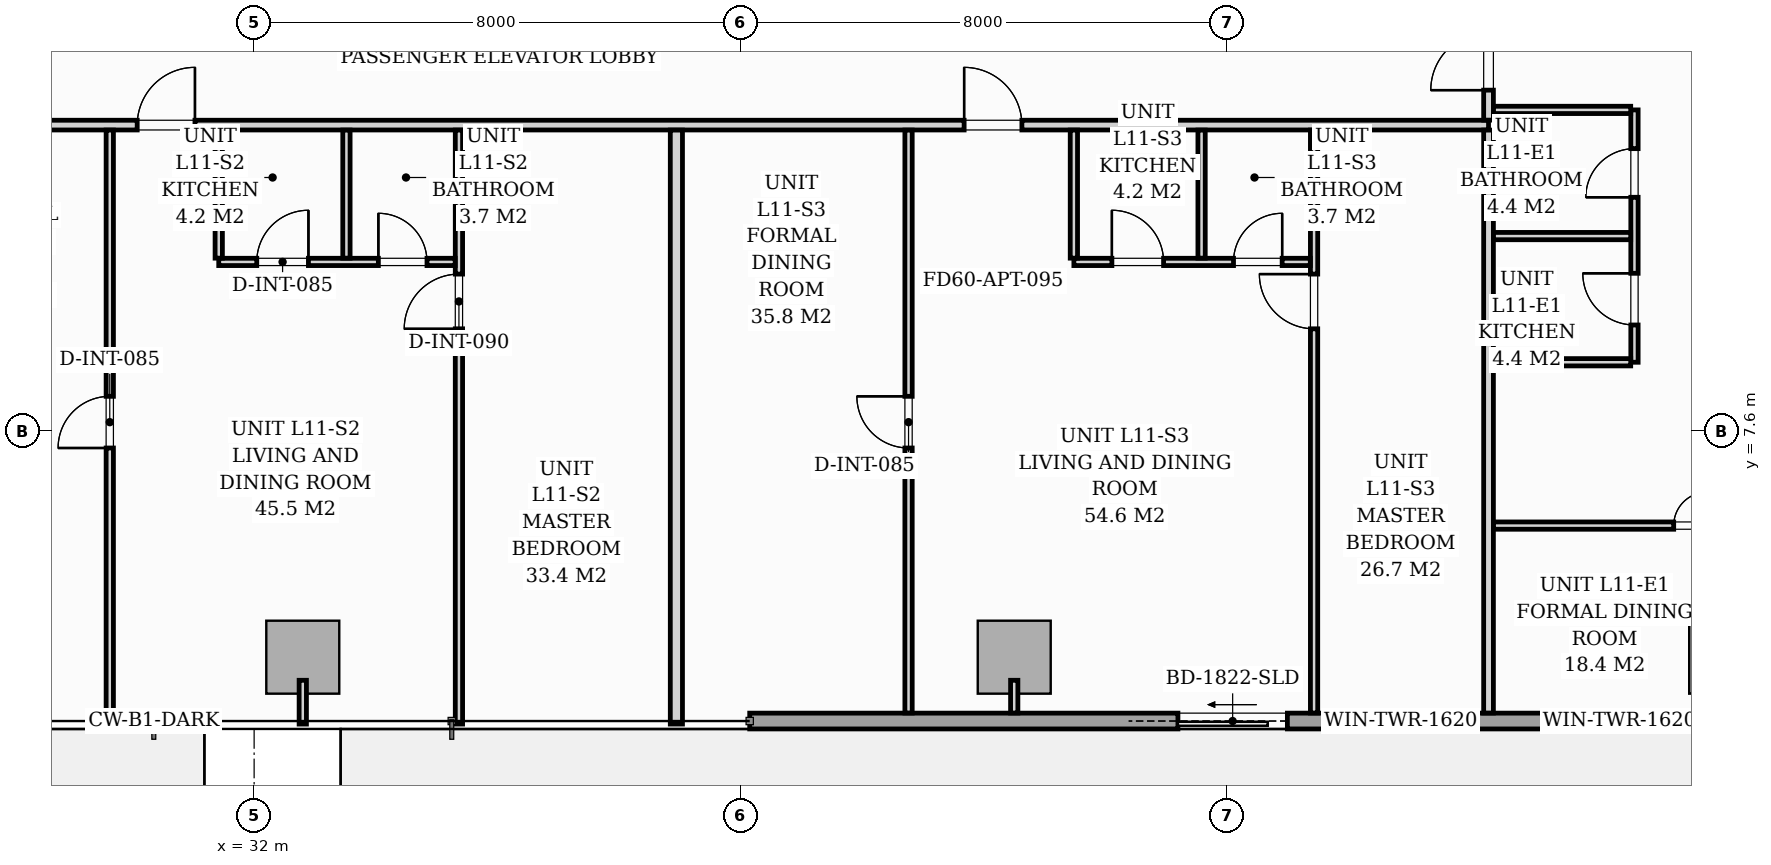
"""IFC4 building model, lengths in metres.
Left out: names, types, materials, properties, quantities, classifications, styles, units other than length and angle.
Written with IfcOpenShell. Run it as: python <this file> out.ifc"""

import sys

from ifc_helpers import new_model, si_unit, direction, frame, frame_2d, origin, origin_2d, place, context, subcontext, project, spatial, rectangle, extrude, source, transform, mapped, element, fill, save


model = new_model("IFC4")
c1 = context("Model", 3, precision=1e-05, world=origin(), true_north=direction((0.0, 1.0)))
c2 = subcontext(c1, "Body", "Model", "MODEL_VIEW")
j1 = project(units=[si_unit("LENGTHUNIT", "METRE"), si_unit("PLANEANGLEUNIT", "RADIAN")], contexts=[c1])
p1 = place(None, origin())
s1 = spatial("IfcSite", under=j1, at=p1, CompositionType="ELEMENT")
p2 = place(p1, origin())
s2 = spatial("IfcBuilding", under=s1, at=p2, CompositionType="ELEMENT")
p3 = place(p2, frame((0.0, 0.0, 42.2)))
s3 = spatial("IfcBuildingStorey", under=s2, at=p3, CompositionType="ELEMENT", Elevation=42.2)
m1 = source(origin(), c2, "Body", "SweptSolid", [
    extrude(rectangle(XDim=1.2, YDim=1.2, at=origin_2d()), origin(), (0.0, 0.0, 1.0), 3.196),
])
for number, where, z_axis, x_axis in (
    (1, (32.8, 3.88, 0.002), (0.0, 0.0, 1.0), (1.0, 0.0, 0.0)),
    (2, (44.5, 3.88, 0.002), (0.0, 0.0, 1.0), (1.0, 0.0, 0.0)),
    (3, (56.2, 3.88, 0.002), (0.0, 0.0, 1.0), (1.0, 0.0, 0.0)),
):
    element("IfcColumn", number, at=place(p3, frame(where, z_axis=z_axis, x_axis=x_axis)), inside=s3, PredefinedType="COLUMN", context=c2, shape_type="MappedRepresentation", body=[
        mapped(m1, transform((0.0, 0.0, 0.0), scale=1.0)),
    ])
p4 = place(p3, frame((57.3, 2.83, 0.0), z_axis=(0.0, 0.0, 1.0), x_axis=(-1.0, 0.0, 0.0)))
e4 = element("IfcWall", 4, at=p4, inside=s3, PredefinedType="STANDARD", context=c2, shape_type="SweptSolid", body=[
    extrude(rectangle(XDim=17.15, YDim=0.26, at=frame_2d((8.575, 0.0))), origin(), (0.0, 0.0, 1.0), 2.94),
])
p5 = place(p4, frame((8.308, 0.0, 0.0)))
e5 = element("IfcOpeningElement", 5, at=p5, cuts=e4, PredefinedType="OPENING", context=c2, shape_type="SweptSolid", body=[
    extrude(rectangle(XDim=1.8, YDim=2.06, at=frame_2d((0.9, 1.03))), frame((0.0, 0.14, 0.0), z_axis=(0.0, -1.0, 0.0), x_axis=(1.0, 0.0, 0.0)), (0.0, 0.0, 1.0), 0.28),
])
p6 = place(p4, frame((2.05, 0.0, 0.65)))
e6 = element("IfcOpeningElement", 6, at=p6, cuts=e4, PredefinedType="OPENING", context=c2, shape_type="SweptSolid", body=[
    extrude(rectangle(XDim=1.6, YDim=1.5, at=frame_2d((0.8, 0.75))), frame((0.0, 0.14, 0.0), z_axis=(0.0, -1.0, 0.0), x_axis=(1.0, 0.0, 0.0)), (0.0, 0.0, 1.0), 0.28),
])
p7 = place(p4, frame((5.644, 0.0, 0.75)))
e7 = element("IfcOpeningElement", 7, at=p7, cuts=e4, PredefinedType="OPENING", context=c2, shape_type="SweptSolid", body=[
    extrude(rectangle(XDim=1.6, YDim=1.5, at=frame_2d((0.8, 0.75))), frame((0.0, 0.14, 0.0), z_axis=(0.0, -1.0, 0.0), x_axis=(1.0, 0.0, 0.0)), (0.0, 0.0, 1.0), 0.28),
])
p8 = place(p3, frame((15.2, 12.63, 0.0), z_axis=(0.0, 0.0, 1.0), x_axis=(1.0, 0.0, 0.0)))
e8 = element("IfcWall", 8, at=p8, inside=s3, PredefinedType="PARTITIONING", context=c2, shape_type="SweptSolid", body=[
    extrude(rectangle(XDim=37.1, YDim=0.16, at=frame_2d((18.55, 0.0))), origin(), (0.0, 0.0, 1.0), 2.94),
])
p9 = place(p8, frame((1.572, 0.0, 0.0)))
e9 = element("IfcOpeningElement", 9, at=p9, cuts=e8, PredefinedType="OPENING", context=c2, shape_type="SweptSolid", body=[
    extrude(rectangle(XDim=0.95, YDim=2.06, at=frame_2d((0.475, 1.03))), frame((0.0, 0.09, 0.0), z_axis=(0.0, -1.0, 0.0), x_axis=(1.0, 0.0, 0.0)), (0.0, 0.0, 1.0), 0.18),
])
p10 = place(p8, frame((14.877, 0.0, 0.0)))
e10 = element("IfcOpeningElement", 10, at=p10, cuts=e8, PredefinedType="OPENING", context=c2, shape_type="SweptSolid", body=[
    extrude(rectangle(XDim=0.95, YDim=2.06, at=frame_2d((0.475, 1.03))), frame((0.0, 0.09, 0.0), z_axis=(0.0, -1.0, 0.0), x_axis=(1.0, 0.0, 0.0)), (0.0, 0.0, 1.0), 0.18),
])
p11 = place(p8, frame((28.476, 0.0, 0.0)))
e11 = element("IfcOpeningElement", 11, at=p11, cuts=e8, PredefinedType="OPENING", context=c2, shape_type="SweptSolid", body=[
    extrude(rectangle(XDim=0.95, YDim=2.06, at=frame_2d((0.475, 1.03))), frame((0.0, 0.09, 0.0), z_axis=(0.0, -1.0, 0.0), x_axis=(1.0, 0.0, 0.0)), (0.0, 0.0, 1.0), 0.18),
])
p12 = place(p3, frame((52.3, 2.962, 0.0), z_axis=(0.0, 0.0, 1.0), x_axis=(0.0, 1.0, 0.0)))
e12 = element("IfcWall", 12, at=p12, inside=s3, PredefinedType="PARTITIONING", context=c2, shape_type="SweptSolid", body=[
    extrude(rectangle(XDim=9.586, YDim=0.16, at=frame_2d((4.793, 0.0))), origin(), (0.0, 0.0, 1.0), 2.94),
])
p13 = place(p3, frame((52.3, 12.712, 0.0), z_axis=(0.0, 0.0, 1.0), x_axis=(0.0, 1.0, 0.0)))
e13 = element("IfcWall", 13, at=p13, inside=s3, PredefinedType="PARTITIONING", context=c2, shape_type="SweptSolid", body=[
    extrude(rectangle(XDim=14.726, YDim=0.16, at=frame_2d((7.363, 0.0))), origin(), (0.0, 0.0, 1.0), 2.94),
])
p14 = place(p13, frame((0.493, 0.0, 0.0)))
e14 = element("IfcOpeningElement", 14, at=p14, cuts=e13, PredefinedType="OPENING", context=c2, shape_type="SweptSolid", body=[
    extrude(rectangle(XDim=0.95, YDim=2.06, at=frame_2d((0.475, 1.03))), frame((0.0, 0.09, 0.0), z_axis=(0.0, -1.0, 0.0), x_axis=(1.0, 0.0, 0.0)), (0.0, 0.0, 1.0), 0.18),
])
p15 = place(p13, frame((5.433, 0.0, 0.0)))
e15 = element("IfcOpeningElement", 15, at=p15, cuts=e13, PredefinedType="OPENING", context=c2, shape_type="SweptSolid", body=[
    extrude(rectangle(XDim=0.95, YDim=2.06, at=frame_2d((0.475, 1.03))), frame((0.0, 0.09, 0.0), z_axis=(0.0, -1.0, 0.0), x_axis=(1.0, 0.0, 0.0)), (0.0, 0.0, 1.0), 0.18),
])
p16 = place(p3, frame((35.368, 2.78, 0.0), z_axis=(0.0, 0.0, 1.0), x_axis=(0.0, 1.0, 0.0)))
e16 = element("IfcWall", 16, at=p16, inside=s3, PredefinedType="PARTITIONING", context=c2, shape_type="SweptSolid", body=[
    extrude(rectangle(XDim=9.768, YDim=0.12, at=frame_2d((4.884, 0.0))), origin(), (0.0, 0.0, 1.0), 2.94),
])
p17 = place(p16, frame((6.5, 0.0, 0.0)))
e17 = element("IfcOpeningElement", 17, at=p17, cuts=e16, PredefinedType="OPENING", context=c2, shape_type="SweptSolid", body=[
    extrude(rectangle(XDim=0.9, YDim=2.05, at=frame_2d((0.45, 1.025))), frame((0.0, 0.07, 0.0), z_axis=(0.0, -1.0, 0.0), x_axis=(1.0, 0.0, 0.0)), (0.0, 0.0, 1.0), 0.14),
])
p18 = place(p3, frame((31.418, 10.38, 0.0), z_axis=(0.0, 0.0, 1.0), x_axis=(1.0, 0.0, 0.0)))
e18 = element("IfcWall", 18, at=p18, inside=s3, PredefinedType="PARTITIONING", context=c2, shape_type="SweptSolid", body=[
    extrude(rectangle(XDim=3.888, YDim=0.12, at=frame_2d((1.944, 0.0))), origin(), (0.0, 0.0, 1.0), 2.94),
])
p19 = place(p18, frame((0.625, 0.0, 0.0)))
e19 = element("IfcOpeningElement", 19, at=p19, cuts=e18, PredefinedType="OPENING", context=c2, shape_type="SweptSolid", body=[
    extrude(rectangle(XDim=0.85, YDim=2.05, at=frame_2d((0.425, 1.025))), frame((0.0, 0.07, 0.0), z_axis=(0.0, -1.0, 0.0), x_axis=(1.0, 0.0, 0.0)), (0.0, 0.0, 1.0), 0.14),
])
p20 = place(p18, frame((2.625, 0.0, 0.0)))
e20 = element("IfcOpeningElement", 20, at=p20, cuts=e18, PredefinedType="OPENING", context=c2, shape_type="SweptSolid", body=[
    extrude(rectangle(XDim=0.8, YDim=2.02, at=frame_2d((0.4, 1.01))), frame((0.0, 0.07, 0.0), z_axis=(0.0, -1.0, 0.0), x_axis=(1.0, 0.0, 0.0)), (0.0, 0.0, 1.0), 0.14),
])
for number, where, z_axis, x_axis in (
    (21, (33.518, 10.442, 0.0), (0.0, 0.0, 1.0), (0.0, 1.0, 0.0)),
    (22, (31.418, 10.442, 0.0), (0.0, 0.0, 1.0), (0.0, 1.0, 0.0)),
):
    element("IfcWall", number, at=place(p3, frame(where, z_axis=z_axis, x_axis=x_axis)), inside=s3, PredefinedType="PARTITIONING", context=c2, shape_type="SweptSolid", body=[
        extrude(rectangle(XDim=2.106, YDim=0.12, at=frame_2d((1.053, 0.0))), origin(), (0.0, 0.0, 1.0), 2.94),
    ])
p21 = place(p3, frame((29.626, 2.78, 0.0), z_axis=(0.0, 0.0, 1.0), x_axis=(0.0, 1.0, 0.0)))
e23 = element("IfcWall", 23, at=p21, inside=s3, PredefinedType="PARTITIONING", context=c2, shape_type="SweptSolid", body=[
    extrude(rectangle(XDim=9.768, YDim=0.12, at=frame_2d((4.884, 0.0))), origin(), (0.0, 0.0, 1.0), 2.94),
])
p22 = place(p21, frame((4.54, 0.0, 0.0)))
e24 = element("IfcOpeningElement", 24, at=p22, cuts=e23, PredefinedType="OPENING", context=c2, shape_type="SweptSolid", body=[
    extrude(rectangle(XDim=0.85, YDim=2.05, at=frame_2d((0.425, 1.025))), frame((0.0, 0.07, 0.0), z_axis=(0.0, -1.0, 0.0), x_axis=(1.0, 0.0, 0.0)), (0.0, 0.0, 1.0), 0.14),
])
p23 = place(p3, frame((38.944, 2.78, 0.0), z_axis=(0.0, 0.0, 1.0), x_axis=(0.0, 1.0, 0.0)))
e25 = element("IfcWall", 25, at=p23, inside=s3, PredefinedType="PARTITIONING", context=c2, shape_type="SweptSolid", body=[
    extrude(rectangle(XDim=9.768, YDim=0.2, at=frame_2d((4.884, 0.0))), origin(), (0.0, 0.0, 1.0), 2.94),
])
p24 = place(p3, frame((49.431, 2.962, 0.0), z_axis=(0.0, 0.0, 1.0), x_axis=(0.0, 1.0, 0.0)))
e26 = element("IfcWall", 26, at=p24, inside=s3, PredefinedType="PARTITIONING", context=c2, shape_type="SweptSolid", body=[
    extrude(rectangle(XDim=9.586, YDim=0.12, at=frame_2d((4.793, 0.0))), origin(), (0.0, 0.0, 1.0), 2.94),
])
p25 = place(p24, frame((6.318, 0.0, 0.0)))
e27 = element("IfcOpeningElement", 27, at=p25, cuts=e26, PredefinedType="OPENING", context=c2, shape_type="SweptSolid", body=[
    extrude(rectangle(XDim=0.9, YDim=2.05, at=frame_2d((0.45, 1.025))), frame((0.0, 0.07, 0.0), z_axis=(0.0, -1.0, 0.0), x_axis=(1.0, 0.0, 0.0)), (0.0, 0.0, 1.0), 0.14),
])
p26 = place(p3, frame((45.481, 10.38, 0.0), z_axis=(0.0, 0.0, 1.0), x_axis=(1.0, 0.0, 0.0)))
e28 = element("IfcWall", 28, at=p26, inside=s3, PredefinedType="PARTITIONING", context=c2, shape_type="SweptSolid", body=[
    extrude(rectangle(XDim=3.888, YDim=0.12, at=frame_2d((1.944, 0.0))), origin(), (0.0, 0.0, 1.0), 2.94),
])
p27 = place(p26, frame((0.625, 0.0, 0.0)))
e29 = element("IfcOpeningElement", 29, at=p27, cuts=e28, PredefinedType="OPENING", context=c2, shape_type="SweptSolid", body=[
    extrude(rectangle(XDim=0.85, YDim=2.05, at=frame_2d((0.425, 1.025))), frame((0.0, 0.07, 0.0), z_axis=(0.0, -1.0, 0.0), x_axis=(1.0, 0.0, 0.0)), (0.0, 0.0, 1.0), 0.14),
])
p28 = place(p26, frame((2.625, 0.0, 0.0)))
e30 = element("IfcOpeningElement", 30, at=p28, cuts=e28, PredefinedType="OPENING", context=c2, shape_type="SweptSolid", body=[
    extrude(rectangle(XDim=0.8, YDim=2.02, at=frame_2d((0.4, 1.01))), frame((0.0, 0.07, 0.0), z_axis=(0.0, -1.0, 0.0), x_axis=(1.0, 0.0, 0.0)), (0.0, 0.0, 1.0), 0.14),
])
for number, where, z_axis, x_axis in (
    (31, (47.581, 10.442, 0.0), (0.0, 0.0, 1.0), (0.0, 1.0, 0.0)),
    (32, (45.481, 10.442, 0.0), (0.0, 0.0, 1.0), (0.0, 1.0, 0.0)),
):
    element("IfcWall", number, at=place(p3, frame(where, z_axis=z_axis, x_axis=x_axis)), inside=s3, PredefinedType="PARTITIONING", context=c2, shape_type="SweptSolid", body=[
        extrude(rectangle(XDim=2.106, YDim=0.12, at=frame_2d((1.053, 0.0))), origin(), (0.0, 0.0, 1.0), 2.94),
    ])
p29 = place(p3, frame((42.762, 2.962, 0.0), z_axis=(0.0, 0.0, 1.0), x_axis=(0.0, 1.0, 0.0)))
e33 = element("IfcWall", 33, at=p29, inside=s3, PredefinedType="PARTITIONING", context=c2, shape_type="SweptSolid", body=[
    extrude(rectangle(XDim=9.586, YDim=0.12, at=frame_2d((4.793, 0.0))), origin(), (0.0, 0.0, 1.0), 2.94),
])
p30 = place(p29, frame((4.358, 0.0, 0.0)))
e34 = element("IfcOpeningElement", 34, at=p30, cuts=e33, PredefinedType="OPENING", context=c2, shape_type="SweptSolid", body=[
    extrude(rectangle(XDim=0.85, YDim=2.05, at=frame_2d((0.425, 1.025))), frame((0.0, 0.07, 0.0), z_axis=(0.0, -1.0, 0.0), x_axis=(1.0, 0.0, 0.0)), (0.0, 0.0, 1.0), 0.14),
])
p31 = place(p3, frame((54.7, 8.73, 0.0), z_axis=(0.0, 0.0, 1.0), x_axis=(0.0, 1.0, 0.0)))
e35 = element("IfcWall", 35, at=p31, inside=s3, PredefinedType="PARTITIONING", context=c2, shape_type="SweptSolid", body=[
    extrude(rectangle(XDim=4.15, YDim=0.12, at=frame_2d((2.075, 0.0))), origin(), (0.0, 0.0, 1.0), 2.94),
])
p32 = place(p31, frame((0.613, 0.0, 0.0)))
e36 = element("IfcOpeningElement", 36, at=p32, cuts=e35, PredefinedType="OPENING", context=c2, shape_type="SweptSolid", body=[
    extrude(rectangle(XDim=0.85, YDim=2.05, at=frame_2d((0.425, 1.025))), frame((0.0, 0.07, 0.0), z_axis=(0.0, -1.0, 0.0), x_axis=(1.0, 0.0, 0.0)), (0.0, 0.0, 1.0), 0.14),
])
p33 = place(p31, frame((2.713, 0.0, 0.0)))
e37 = element("IfcOpeningElement", 37, at=p33, cuts=e35, PredefinedType="OPENING", context=c2, shape_type="SweptSolid", body=[
    extrude(rectangle(XDim=0.8, YDim=2.02, at=frame_2d((0.4, 1.01))), frame((0.0, 0.07, 0.0), z_axis=(0.0, -1.0, 0.0), x_axis=(1.0, 0.0, 0.0)), (0.0, 0.0, 1.0), 0.14),
])
for number, where, z_axis, x_axis in (
    (38, (52.382, 10.805, 0.0), (0.0, 0.0, 1.0), (1.0, 0.0, 0.0)),
    (39, (52.382, 8.73, 0.0), (0.0, 0.0, 1.0), (1.0, 0.0, 0.0)),
    (40, (52.382, 12.88, 0.0), (0.0, 0.0, 1.0), (1.0, 0.0, 0.0)),
):
    element("IfcWall", number, at=place(p3, frame(where, z_axis=z_axis, x_axis=x_axis)), inside=s3, PredefinedType="PARTITIONING", context=c2, shape_type="SweptSolid", body=[
        extrude(rectangle(XDim=2.256, YDim=0.12, at=frame_2d((1.128, 0.0))), origin(), (0.0, 0.0, 1.0), 2.94),
    ])
p34 = place(p3, frame((52.382, 6.044, 0.0), z_axis=(0.0, 0.0, 1.0), x_axis=(1.0, 0.0, 0.0)))
e41 = element("IfcWall", 41, at=p34, inside=s3, PredefinedType="PARTITIONING", context=c2, shape_type="SweptSolid", body=[
    extrude(rectangle(XDim=7.338, YDim=0.12, at=frame_2d((3.669, 0.0))), origin(), (0.0, 0.0, 1.0), 2.94),
])
p35 = place(p34, frame((2.963, 0.0, 0.0)))
e42 = element("IfcOpeningElement", 42, at=p35, cuts=e41, PredefinedType="OPENING", context=c2, shape_type="SweptSolid", body=[
    extrude(rectangle(XDim=0.55, YDim=2.0, at=frame_2d((0.275, 1.0))), frame((0.0, 0.07, 0.0), z_axis=(0.0, -1.0, 0.0), x_axis=(1.0, 0.0, 0.0)), (0.0, 0.0, 1.0), 0.14),
])
p36 = place(p3, frame((32.8, 3.5, 0.0), z_axis=(0.0, 0.0, 1.0), x_axis=(0.0, -1.0, 0.0)))
e43 = element("IfcWall", 43, at=p36, inside=s3, PredefinedType="PARTITIONING", context=c2, shape_type="SweptSolid", body=[
    extrude(rectangle(XDim=0.72, YDim=0.12, at=frame_2d((0.36, 0.0))), origin(), (0.0, 0.0, 1.0), 2.94),
])
p37 = place(p3, frame((44.5, 3.5, 0.0), z_axis=(0.0, 0.0, 1.0), x_axis=(0.0, -1.0, 0.0)))
e44 = element("IfcWall", 44, at=p37, inside=s3, PredefinedType="PARTITIONING", context=c2, shape_type="SweptSolid", body=[
    extrude(rectangle(XDim=0.538, YDim=0.12, at=frame_2d((0.269, 0.0))), origin(), (0.0, 0.0, 1.0), 2.94),
])
m2 = source(origin(), c2, "Body", "SweptSolid", [
    extrude(rectangle(XDim=1.8, YDim=2.06, at=frame_2d((0.9, 1.03))), frame((0.0, 0.025, 0.0), z_axis=(0.0, -1.0, 0.0), x_axis=(1.0, 0.0, 0.0)), (0.0, 0.0, 1.0), 0.05),
])
p38 = place(p5, origin())
e45 = element("IfcDoor", 45, at=p38, inside=s3, OperationType="SLIDING_TO_RIGHT", PredefinedType="DOOR", context=c2, shape_type="MappedRepresentation", body=[
    mapped(m2, transform((0.0, 0.0, 0.0), scale=1.0)),
])
fill(e5, e45)
m3 = source(origin(), c2, "Body", "SweptSolid", [
    extrude(rectangle(XDim=1.6, YDim=1.5, at=frame_2d((0.8, 0.75))), frame((0.0, 0.03, 0.0), z_axis=(0.0, -1.0, 0.0), x_axis=(1.0, 0.0, 0.0)), (0.0, 0.0, 1.0), 0.06),
])
p39 = place(p6, origin())
e46 = element("IfcWindow", 46, at=p39, inside=s3, PartitioningType="SINGLE_PANEL", PredefinedType="WINDOW", context=c2, shape_type="MappedRepresentation", body=[
    mapped(m3, transform((0.0, 0.0, 0.0), scale=1.0)),
])
fill(e6, e46)
p40 = place(p7, origin())
e47 = element("IfcWindow", 47, at=p40, inside=s3, PartitioningType="SINGLE_PANEL", PredefinedType="WINDOW", context=c2, shape_type="MappedRepresentation", body=[
    mapped(m3, transform((0.0, 0.0, 0.0), scale=1.0)),
])
fill(e7, e47)
m4 = source(origin(), c2, "Body", "SweptSolid", [
    extrude(rectangle(XDim=0.85, YDim=2.05, at=frame_2d((0.425, 1.025))), frame((0.0, 0.025, 0.0), z_axis=(0.0, -1.0, 0.0), x_axis=(1.0, 0.0, 0.0)), (0.0, 0.0, 1.0), 0.05),
])
p41 = place(p22, origin())
e48 = element("IfcDoor", 48, at=p41, inside=s3, OperationType="SINGLE_SWING_LEFT", PredefinedType="DOOR", context=c2, shape_type="MappedRepresentation", body=[
    mapped(m4, transform((0.0, 0.0, 0.0), scale=1.0)),
])
fill(e24, e48)
m5 = source(origin(), c2, "Body", "SweptSolid", [
    extrude(rectangle(XDim=0.95, YDim=2.06, at=frame_2d((0.475, 1.03))), frame((0.0, 0.025, 0.0), z_axis=(0.0, -1.0, 0.0), x_axis=(1.0, 0.0, 0.0)), (0.0, 0.0, 1.0), 0.05),
])
p42 = place(p10, origin())
e49 = element("IfcDoor", 49, at=p42, inside=s3, OperationType="SINGLE_SWING_RIGHT", PredefinedType="DOOR", context=c2, shape_type="MappedRepresentation", body=[
    mapped(m5, transform((0.0, 0.0, 0.0), scale=1.0)),
])
fill(e10, e49)
m6 = source(origin(), c2, "Body", "SweptSolid", [
    extrude(rectangle(XDim=0.9, YDim=2.05, at=frame_2d((0.45, 1.025))), frame((0.0, 0.025, 0.0), z_axis=(0.0, -1.0, 0.0), x_axis=(1.0, 0.0, 0.0)), (0.0, 0.0, 1.0), 0.05),
])
p43 = place(p17, origin())
e50 = element("IfcDoor", 50, at=p43, inside=s3, OperationType="SINGLE_SWING_LEFT", PredefinedType="DOOR", context=c2, shape_type="MappedRepresentation", body=[
    mapped(m6, transform((0.0, 0.0, 0.0), scale=1.0)),
])
fill(e17, e50)
p44 = place(p19, origin())
e51 = element("IfcDoor", 51, at=p44, inside=s3, OperationType="SINGLE_SWING_RIGHT", PredefinedType="DOOR", context=c2, shape_type="MappedRepresentation", body=[
    mapped(m4, transform((0.0, 0.0, 0.0), scale=1.0)),
])
fill(e19, e51)
m7 = source(origin(), c2, "Body", "SweptSolid", [
    extrude(rectangle(XDim=0.8, YDim=2.02, at=frame_2d((0.4, 1.01))), frame((0.0, 0.025, 0.0), z_axis=(0.0, -1.0, 0.0), x_axis=(1.0, 0.0, 0.0)), (0.0, 0.0, 1.0), 0.05),
])
p45 = place(p20, origin())
e52 = element("IfcDoor", 52, at=p45, inside=s3, OperationType="SINGLE_SWING_LEFT", PredefinedType="DOOR", context=c2, shape_type="MappedRepresentation", body=[
    mapped(m7, transform((0.0, 0.0, 0.0), scale=1.0)),
])
fill(e20, e52)
p46 = place(p30, origin())
e53 = element("IfcDoor", 53, at=p46, inside=s3, OperationType="SINGLE_SWING_RIGHT", PredefinedType="DOOR", context=c2, shape_type="MappedRepresentation", body=[
    mapped(m4, transform((0.0, 0.0, 0.0), scale=1.0)),
])
fill(e34, e53)
p47 = place(p11, origin())
e54 = element("IfcDoor", 54, at=p47, inside=s3, OperationType="SINGLE_SWING_LEFT", PredefinedType="DOOR", context=c2, shape_type="MappedRepresentation", body=[
    mapped(m5, transform((0.0, 0.0, 0.0), scale=1.0)),
])
fill(e11, e54)
p48 = place(p25, origin())
e55 = element("IfcDoor", 55, at=p48, inside=s3, OperationType="SINGLE_SWING_RIGHT", PredefinedType="DOOR", context=c2, shape_type="MappedRepresentation", body=[
    mapped(m6, transform((0.0, 0.0, 0.0), scale=1.0)),
])
fill(e27, e55)
p49 = place(p27, origin())
e56 = element("IfcDoor", 56, at=p49, inside=s3, OperationType="SINGLE_SWING_LEFT", PredefinedType="DOOR", context=c2, shape_type="MappedRepresentation", body=[
    mapped(m4, transform((0.0, 0.0, 0.0), scale=1.0)),
])
fill(e29, e56)
p50 = place(p28, origin())
e57 = element("IfcDoor", 57, at=p50, inside=s3, OperationType="SINGLE_SWING_RIGHT", PredefinedType="DOOR", context=c2, shape_type="MappedRepresentation", body=[
    mapped(m7, transform((0.0, 0.0, 0.0), scale=1.0)),
])
fill(e30, e57)
p51 = place(p14, origin())
e58 = element("IfcDoor", 58, at=p51, inside=s3, OperationType="SINGLE_SWING_LEFT", PredefinedType="DOOR", context=c2, shape_type="MappedRepresentation", body=[
    mapped(m5, transform((0.0, 0.0, 0.0), scale=1.0)),
])
fill(e14, e58)
p52 = place(p32, origin())
e59 = element("IfcDoor", 59, at=p52, inside=s3, OperationType="SINGLE_SWING_RIGHT", PredefinedType="DOOR", context=c2, shape_type="MappedRepresentation", body=[
    mapped(m4, transform((0.0, 0.0, 0.0), scale=1.0)),
])
fill(e36, e59)
p53 = place(p33, origin())
e60 = element("IfcDoor", 60, at=p53, inside=s3, OperationType="SINGLE_SWING_LEFT", PredefinedType="DOOR", context=c2, shape_type="MappedRepresentation", body=[
    mapped(m7, transform((0.0, 0.0, 0.0), scale=1.0)),
])
fill(e37, e60)
m8 = source(origin(), c2, "Body", "SweptSolid", [
    extrude(rectangle(XDim=0.55, YDim=2.0, at=frame_2d((0.275, 1.0))), frame((0.0, 0.025, 0.0), z_axis=(0.0, -1.0, 0.0), x_axis=(1.0, 0.0, 0.0)), (0.0, 0.0, 1.0), 0.05),
])
p54 = place(p35, origin())
e61 = element("IfcDoor", 61, at=p54, inside=s3, OperationType="SINGLE_SWING_RIGHT", PredefinedType="DOOR", context=c2, shape_type="MappedRepresentation", body=[
    mapped(m8, transform((0.0, 0.0, 0.0), scale=1.0)),
])
fill(e42, e61)
save(model, sys.argv[1])
